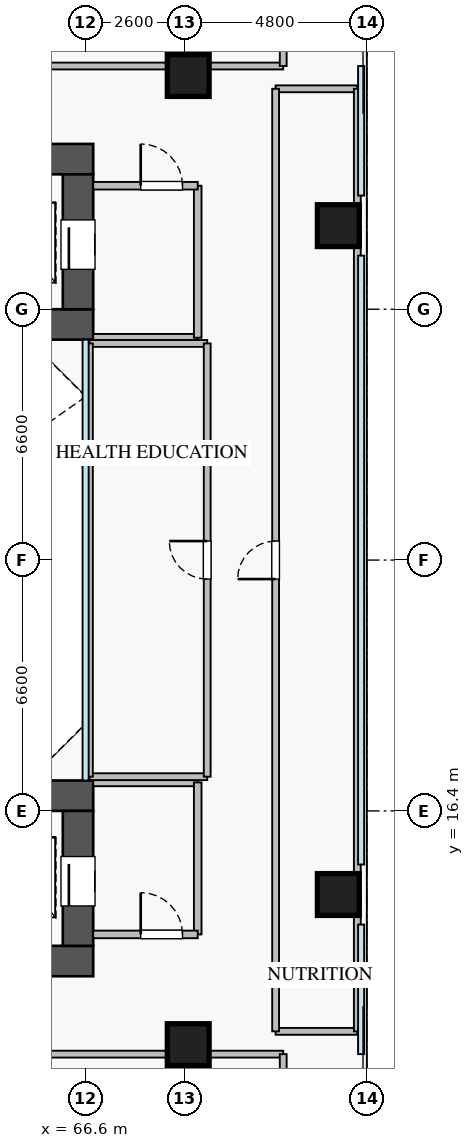
"""IFC4 building model, lengths in metres.
Left out: names, types, materials, properties, quantities, classifications, styles, units other than length and angle.
Written with IfcOpenShell. Run it as: python <this file> out.ifc"""

import sys

from ifc_helpers import new_model, si_unit, direction, frame, frame_2d, origin, origin_2d, place, context, subcontext, project, spatial, rectangle, extrude, source, transform, mapped, element, fill, save


model = new_model("IFC4")
c1 = context("Model", 3, precision=1e-05, world=origin(), true_north=direction((0.0, 1.0)))
c2 = subcontext(c1, "Body", "Model", "MODEL_VIEW")
j1 = project(units=[si_unit("LENGTHUNIT", "METRE"), si_unit("PLANEANGLEUNIT", "RADIAN")], contexts=[c1])
p1 = place(None, origin())
s1 = spatial("IfcSite", under=j1, at=p1, CompositionType="ELEMENT")
p2 = place(p1, origin())
s2 = spatial("IfcBuilding", under=s1, at=p2, CompositionType="ELEMENT")
p3 = place(p2, frame((0.0, 0.0, 5.0)))
s3 = spatial("IfcBuildingStorey", under=s2, at=p3, CompositionType="ELEMENT", Elevation=5.0)
p4 = place(p3, frame((54.2, 29.2, 0.0), z_axis=(0.0, 0.0, 1.0), x_axis=(1.0, 0.0, 0.0)))
e1 = element("IfcWall", 1, at=p4, inside=s3, PredefinedType="SHEAR", context=c2, shape_type="SweptSolid", body=[
    extrude(rectangle(XDim=12.6, YDim=0.8, at=frame_2d((6.3, 0.0))), origin(), (0.0, 0.0, 1.0), 4.4),
])
p5 = place(p3, frame((54.2, 33.55, 0.0), z_axis=(0.0, 0.0, 1.0), x_axis=(1.0, 0.0, 0.0)))
e2 = element("IfcWall", 2, at=p5, inside=s3, PredefinedType="SHEAR", context=c2, shape_type="SweptSolid", body=[
    extrude(rectangle(XDim=12.6, YDim=0.8, at=frame_2d((6.3, 0.0))), origin(), (0.0, 0.0, 1.0), 4.4),
])
p6 = place(p5, frame((8.2, 0.0, 0.0)))
e3 = element("IfcOpeningElement", 3, at=p6, cuts=e2, PredefinedType="OPENING", context=c2, shape_type="SweptSolid", body=[
    extrude(rectangle(XDim=1.1, YDim=2.05, at=frame_2d((0.55, 1.025))), frame((0.0, 0.41, 0.0), z_axis=(0.0, -1.0, 0.0), x_axis=(1.0, 0.0, 0.0)), (0.0, 0.0, 1.0), 0.82),
])
p7 = place(p3, frame((66.4, 29.6, 0.0), z_axis=(0.0, 0.0, 1.0), x_axis=(0.0, 1.0, 0.0)))
e4 = element("IfcWall", 4, at=p7, inside=s3, PredefinedType="SHEAR", context=c2, shape_type="SweptSolid", body=[
    extrude(rectangle(XDim=3.55, YDim=0.8, at=frame_2d((1.775, 0.0))), origin(), (0.0, 0.0, 1.0), 4.4),
])
p8 = place(p7, frame((1.05, 0.0, 0.0)))
e5 = element("IfcOpeningElement", 5, at=p8, cuts=e4, PredefinedType="OPENING", context=c2, shape_type="SweptSolid", body=[
    extrude(rectangle(XDim=1.3, YDim=2.05, at=frame_2d((0.65, 1.025))), frame((0.0, 0.41, 0.0), z_axis=(0.0, -1.0, 0.0), x_axis=(1.0, 0.0, 0.0)), (0.0, 0.0, 1.0), 0.82),
])
p9 = place(p3, frame((54.2, 12.45, 0.0), z_axis=(0.0, 0.0, 1.0), x_axis=(1.0, 0.0, 0.0)))
e6 = element("IfcWall", 6, at=p9, inside=s3, PredefinedType="SHEAR", context=c2, shape_type="SweptSolid", body=[
    extrude(rectangle(XDim=12.6, YDim=0.8, at=frame_2d((6.3, 0.0))), origin(), (0.0, 0.0, 1.0), 4.4),
])
p10 = place(p9, frame((8.2, 0.0, 0.0)))
e7 = element("IfcOpeningElement", 7, at=p10, cuts=e6, PredefinedType="OPENING", context=c2, shape_type="SweptSolid", body=[
    extrude(rectangle(XDim=1.1, YDim=2.05, at=frame_2d((0.55, 1.025))), frame((0.0, 0.41, 0.0), z_axis=(0.0, -1.0, 0.0), x_axis=(1.0, 0.0, 0.0)), (0.0, 0.0, 1.0), 0.82),
])
p11 = place(p3, frame((54.2, 16.8, 0.0), z_axis=(0.0, 0.0, 1.0), x_axis=(1.0, 0.0, 0.0)))
e8 = element("IfcWall", 8, at=p11, inside=s3, PredefinedType="SHEAR", context=c2, shape_type="SweptSolid", body=[
    extrude(rectangle(XDim=12.6, YDim=0.8, at=frame_2d((6.3, 0.0))), origin(), (0.0, 0.0, 1.0), 4.4),
])
p12 = place(p3, frame((66.4, 12.85, 0.0), z_axis=(0.0, 0.0, 1.0), x_axis=(0.0, 1.0, 0.0)))
e9 = element("IfcWall", 9, at=p12, inside=s3, PredefinedType="SHEAR", context=c2, shape_type="SweptSolid", body=[
    extrude(rectangle(XDim=3.55, YDim=0.8, at=frame_2d((1.775, 0.0))), origin(), (0.0, 0.0, 1.0), 4.4),
])
p13 = place(p12, frame((1.05, 0.0, 0.0)))
e10 = element("IfcOpeningElement", 10, at=p13, cuts=e9, PredefinedType="OPENING", context=c2, shape_type="SweptSolid", body=[
    extrude(rectangle(XDim=1.3, YDim=2.05, at=frame_2d((0.65, 1.025))), frame((0.0, 0.41, 0.0), z_axis=(0.0, -1.0, 0.0), x_axis=(1.0, 0.0, 0.0)), (0.0, 0.0, 1.0), 0.82),
])
m1 = source(origin(), c2, "Body", "SweptSolid", [
    extrude(rectangle(XDim=1.1, YDim=1.1, at=origin_2d()), origin(), (0.0, 0.0, 1.0), 4.4),
])
for number, where, z_axis, x_axis in (
    (11, (69.3, 10.25, 0.0), (0.0, 0.0, 1.0), (1.0, 0.0, 0.0)),
    (12, (73.25, 14.2, 0.0), (0.0, 0.0, 1.0), (1.0, 0.0, 0.0)),
    (13, (73.25, 31.8, 0.0), (0.0, 0.0, 1.0), (1.0, 0.0, 0.0)),
    (14, (69.3, 35.75, 0.0), (0.0, 0.0, 1.0), (1.0, 0.0, 0.0)),
):
    element("IfcColumn", number, at=place(p3, frame(where, z_axis=z_axis, x_axis=x_axis)), inside=s3, PredefinedType="COLUMN", context=c2, shape_type="MappedRepresentation", body=[
        mapped(m1, transform((0.0, 0.0, 0.0), x_axis=(1.0, 0.0, 0.0), y_axis=(0.0, 1.0, 0.0), z_axis=(0.0, 0.0, 1.0), scale=1.0)),
    ])
p14 = place(p3, frame((66.8, 28.85, 0.0), z_axis=(0.0, 0.0, 1.0), x_axis=(1.0, 0.0, 0.0)))
e15 = element("IfcWall", 15, at=p14, inside=s3, PredefinedType="PARTITIONING", context=c2, shape_type="SweptSolid", body=[
    extrude(rectangle(XDim=2.75, YDim=0.2, at=frame_2d((1.375, 0.0))), origin(), (0.0, 0.0, 1.0), 4.18),
])
p15 = place(p3, frame((69.55, 28.85, 0.0), z_axis=(0.0, 0.0, 1.0), x_axis=(0.0, 1.0, 0.0)))
e16 = element("IfcWall", 16, at=p15, inside=s3, PredefinedType="PARTITIONING", context=c2, shape_type="SweptSolid", body=[
    extrude(rectangle(XDim=4.0, YDim=0.2, at=frame_2d((2.0, 0.0))), origin(), (0.0, 0.0, 1.0), 4.18),
])
p16 = place(p3, frame((66.8, 32.85, 0.0), z_axis=(0.0, 0.0, 1.0), x_axis=(1.0, 0.0, 0.0)))
e17 = element("IfcWall", 17, at=p16, inside=s3, PredefinedType="PARTITIONING", context=c2, shape_type="SweptSolid", body=[
    extrude(rectangle(XDim=2.75, YDim=0.2, at=frame_2d((1.375, 0.0))), origin(), (0.0, 0.0, 1.0), 4.18),
])
p17 = place(p16, frame((1.25, 0.0, 0.0)))
e18 = element("IfcOpeningElement", 18, at=p17, cuts=e17, PredefinedType="OPENING", context=c2, shape_type="SweptSolid", body=[
    extrude(rectangle(XDim=1.1, YDim=2.05, at=frame_2d((0.55, 1.025))), frame((0.0, 0.11, 0.0), z_axis=(0.0, -1.0, 0.0), x_axis=(1.0, 0.0, 0.0)), (0.0, 0.0, 1.0), 0.22),
])
p18 = place(p3, frame((66.8, 17.15, 0.0), z_axis=(0.0, 0.0, 1.0), x_axis=(1.0, 0.0, 0.0)))
e19 = element("IfcWall", 19, at=p18, inside=s3, PredefinedType="PARTITIONING", context=c2, shape_type="SweptSolid", body=[
    extrude(rectangle(XDim=2.75, YDim=0.2, at=frame_2d((1.375, 0.0))), origin(), (0.0, 0.0, 1.0), 4.18),
])
p19 = place(p3, frame((69.55, 13.15, 0.0), z_axis=(0.0, 0.0, 1.0), x_axis=(0.0, 1.0, 0.0)))
e20 = element("IfcWall", 20, at=p19, inside=s3, PredefinedType="PARTITIONING", context=c2, shape_type="SweptSolid", body=[
    extrude(rectangle(XDim=4.0, YDim=0.2, at=frame_2d((2.0, 0.0))), origin(), (0.0, 0.0, 1.0), 4.18),
])
p20 = place(p3, frame((66.8, 13.15, 0.0), z_axis=(0.0, 0.0, 1.0), x_axis=(1.0, 0.0, 0.0)))
e21 = element("IfcWall", 21, at=p20, inside=s3, PredefinedType="PARTITIONING", context=c2, shape_type="SweptSolid", body=[
    extrude(rectangle(XDim=2.75, YDim=0.2, at=frame_2d((1.375, 0.0))), origin(), (0.0, 0.0, 1.0), 4.18),
])
p21 = place(p20, frame((1.25, 0.0, 0.0)))
e22 = element("IfcOpeningElement", 22, at=p21, cuts=e21, PredefinedType="OPENING", context=c2, shape_type="SweptSolid", body=[
    extrude(rectangle(XDim=1.1, YDim=2.05, at=frame_2d((0.55, 1.025))), frame((0.0, 0.11, 0.0), z_axis=(0.0, -1.0, 0.0), x_axis=(1.0, 0.0, 0.0)), (0.0, 0.0, 1.0), 0.22),
])
for number, where, z_axis, x_axis in (
    (23, (66.7, 17.3, 0.0), (0.0, 0.0, 1.0), (1.0, 0.0, 0.0)),
    (24, (66.7, 28.7, 0.0), (0.0, 0.0, 1.0), (1.0, 0.0, 0.0)),
):
    element("IfcWall", number, at=place(p3, frame(where, z_axis=z_axis, x_axis=x_axis)), inside=s3, PredefinedType="PARTITIONING", context=c2, shape_type="SweptSolid", body=[
        extrude(rectangle(XDim=3.1, YDim=0.18, at=frame_2d((1.55, 0.0))), origin(), (0.0, 0.0, 1.0), 4.18),
    ])
p22 = place(p3, frame((66.7, 17.3, 0.0), z_axis=(0.0, 0.0, 1.0), x_axis=(0.0, 1.0, 0.0)))
e25 = element("IfcWall", 25, at=p22, inside=s3, PredefinedType="PARTITIONING", context=c2, shape_type="SweptSolid", body=[
    extrude(rectangle(XDim=11.4, YDim=0.18, at=frame_2d((5.7, 0.0))), origin(), (0.0, 0.0, 1.0), 4.18),
])
p23 = place(p3, frame((69.8, 17.3, 0.0), z_axis=(0.0, 0.0, 1.0), x_axis=(0.0, 1.0, 0.0)))
e26 = element("IfcWall", 26, at=p23, inside=s3, PredefinedType="PARTITIONING", context=c2, shape_type="SweptSolid", body=[
    extrude(rectangle(XDim=11.4, YDim=0.18, at=frame_2d((5.7, 0.0))), origin(), (0.0, 0.0, 1.0), 4.18),
])
p24 = place(p23, frame((5.2, 0.0, 0.0)))
e27 = element("IfcOpeningElement", 27, at=p24, cuts=e26, PredefinedType="OPENING", context=c2, shape_type="SweptSolid", body=[
    extrude(rectangle(XDim=1.0, YDim=2.05, at=frame_2d((0.5, 1.025))), frame((0.0, 0.1, 0.0), z_axis=(0.0, -1.0, 0.0), x_axis=(1.0, 0.0, 0.0)), (0.0, 0.0, 1.0), 0.2),
])
for number, where, z_axis, x_axis in (
    (28, (71.6, 10.6, 0.0), (0.0, 0.0, 1.0), (1.0, 0.0, 0.0)),
    (29, (71.6, 35.4, 0.0), (0.0, 0.0, 1.0), (1.0, 0.0, 0.0)),
):
    element("IfcWall", number, at=place(p3, frame(where, z_axis=z_axis, x_axis=x_axis)), inside=s3, PredefinedType="PARTITIONING", context=c2, shape_type="SweptSolid", body=[
        extrude(rectangle(XDim=2.15, YDim=0.18, at=frame_2d((1.075, 0.0))), origin(), (0.0, 0.0, 1.0), 4.18),
    ])
p25 = place(p3, frame((71.6, 10.6, 0.0), z_axis=(0.0, 0.0, 1.0), x_axis=(0.0, 1.0, 0.0)))
e30 = element("IfcWall", 30, at=p25, inside=s3, PredefinedType="PARTITIONING", context=c2, shape_type="SweptSolid", body=[
    extrude(rectangle(XDim=24.8, YDim=0.18, at=frame_2d((12.4, 0.0))), origin(), (0.0, 0.0, 1.0), 4.18),
])
p26 = place(p25, frame((11.9, 0.0, 0.0)))
e31 = element("IfcOpeningElement", 31, at=p26, cuts=e30, PredefinedType="OPENING", context=c2, shape_type="SweptSolid", body=[
    extrude(rectangle(XDim=1.0, YDim=2.05, at=frame_2d((0.5, 1.025))), frame((0.0, 0.1, 0.0), z_axis=(0.0, -1.0, 0.0), x_axis=(1.0, 0.0, 0.0)), (0.0, 0.0, 1.0), 0.2),
])
p27 = place(p3, frame((73.75, 10.6, 0.0), z_axis=(0.0, 0.0, 1.0), x_axis=(0.0, 1.0, 0.0)))
e32 = element("IfcWall", 32, at=p27, inside=s3, PredefinedType="PARTITIONING", context=c2, shape_type="SweptSolid", body=[
    extrude(rectangle(XDim=24.8, YDim=0.18, at=frame_2d((12.4, 0.0))), origin(), (0.0, 0.0, 1.0), 4.18),
])
p28 = place(p3, frame((54.2, 10.0, 0.0), z_axis=(0.0, 0.0, 1.0), x_axis=(1.0, 0.0, 0.0)))
e33 = element("IfcWall", 33, at=p28, inside=s3, PredefinedType="PARTITIONING", context=c2, shape_type="SweptSolid", body=[
    extrude(rectangle(XDim=17.6, YDim=0.18, at=frame_2d((8.8, 0.0))), origin(), (0.0, 0.0, 1.0), 3.675),
])
p29 = place(p28, frame((8.3, 0.0, 0.0)))
e34 = element("IfcOpeningElement", 34, at=p29, cuts=e33, PredefinedType="OPENING", context=c2, shape_type="SweptSolid", body=[
    extrude(rectangle(XDim=1.0, YDim=2.05, at=frame_2d((0.5, 1.025))), frame((0.0, 0.1, 0.0), z_axis=(0.0, -1.0, 0.0), x_axis=(1.0, 0.0, 0.0)), (0.0, 0.0, 1.0), 0.2),
])
p30 = place(p3, frame((71.8, 2.4, 0.0), z_axis=(0.0, 0.0, 1.0), x_axis=(0.0, 1.0, 0.0)))
e35 = element("IfcWall", 35, at=p30, inside=s3, PredefinedType="PARTITIONING", context=c2, shape_type="SweptSolid", body=[
    extrude(rectangle(XDim=7.6, YDim=0.18, at=frame_2d((3.8, 0.0))), origin(), (0.0, 0.0, 1.0), 4.18),
])
p31 = place(p3, frame((54.2, 36.0, 0.0), z_axis=(0.0, 0.0, 1.0), x_axis=(1.0, 0.0, 0.0)))
e36 = element("IfcWall", 36, at=p31, inside=s3, PredefinedType="PARTITIONING", context=c2, shape_type="SweptSolid", body=[
    extrude(rectangle(XDim=17.6, YDim=0.18, at=frame_2d((8.8, 0.0))), origin(), (0.0, 0.0, 1.0), 3.675),
])
p32 = place(p31, frame((8.3, 0.0, 0.0)))
e37 = element("IfcOpeningElement", 37, at=p32, cuts=e36, PredefinedType="OPENING", context=c2, shape_type="SweptSolid", body=[
    extrude(rectangle(XDim=1.0, YDim=2.05, at=frame_2d((0.5, 1.025))), frame((0.0, 0.1, 0.0), z_axis=(0.0, -1.0, 0.0), x_axis=(1.0, 0.0, 0.0)), (0.0, 0.0, 1.0), 0.2),
])
p33 = place(p3, frame((71.8, 36.0, 0.0), z_axis=(0.0, 0.0, 1.0), x_axis=(0.0, 1.0, 0.0)))
e38 = element("IfcWall", 38, at=p33, inside=s3, PredefinedType="PARTITIONING", context=c2, shape_type="SweptSolid", body=[
    extrude(rectangle(XDim=7.6, YDim=0.18, at=frame_2d((3.8, 0.0))), origin(), (0.0, 0.0, 1.0), 4.18),
])
m2 = source(origin(), c2, "Body", "SweptSolid", [
    extrude(rectangle(XDim=1.3, YDim=2.05, at=frame_2d((0.65, 1.025))), frame((0.0, 0.025, 0.0), z_axis=(0.0, -1.0, 0.0), x_axis=(1.0, 0.0, 0.0)), (0.0, 0.0, 1.0), 0.05),
])
p34 = place(p8, origin())
e39 = element("IfcDoor", 39, at=p34, inside=s3, OperationType="SLIDING_TO_LEFT", PredefinedType="DOOR", context=c2, shape_type="MappedRepresentation", body=[
    mapped(m2, transform((0.0, 0.0, 0.0), x_axis=(1.0, 0.0, 0.0), y_axis=(0.0, 1.0, 0.0), z_axis=(0.0, 0.0, 1.0), scale=1.0)),
])
fill(e5, e39)
p35 = place(p13, origin())
e40 = element("IfcDoor", 40, at=p35, inside=s3, OperationType="SLIDING_TO_RIGHT", PredefinedType="DOOR", context=c2, shape_type="MappedRepresentation", body=[
    mapped(m2, transform((0.0, 0.0, 0.0), x_axis=(1.0, 0.0, 0.0), y_axis=(0.0, 1.0, 0.0), z_axis=(0.0, 0.0, 1.0), scale=1.0)),
])
fill(e10, e40)
m3 = source(origin(), c2, "Body", "SweptSolid", [
    extrude(rectangle(XDim=1.1, YDim=2.05, at=frame_2d((0.55, 1.025))), frame((0.0, 0.025, 0.0), z_axis=(0.0, -1.0, 0.0), x_axis=(1.0, 0.0, 0.0)), (0.0, 0.0, 1.0), 0.05),
])
p36 = place(p17, origin())
e41 = element("IfcDoor", 41, at=p36, inside=s3, OperationType="SINGLE_SWING_LEFT", PredefinedType="DOOR", context=c2, shape_type="MappedRepresentation", body=[
    mapped(m3, transform((0.0, 0.0, 0.0), x_axis=(1.0, 0.0, 0.0), y_axis=(0.0, 1.0, 0.0), z_axis=(0.0, 0.0, 1.0), scale=1.0)),
])
fill(e18, e41)
p37 = place(p21, origin())
e42 = element("IfcDoor", 42, at=p37, inside=s3, OperationType="SINGLE_SWING_LEFT", PredefinedType="DOOR", context=c2, shape_type="MappedRepresentation", body=[
    mapped(m3, transform((0.0, 0.0, 0.0), x_axis=(1.0, 0.0, 0.0), y_axis=(0.0, 1.0, 0.0), z_axis=(0.0, 0.0, 1.0), scale=1.0)),
])
fill(e22, e42)
m4 = source(origin(), c2, "Body", "SweptSolid", [
    extrude(rectangle(XDim=1.0, YDim=2.05, at=frame_2d((0.5, 1.025))), frame((0.0, 0.025, 0.0), z_axis=(0.0, -1.0, 0.0), x_axis=(1.0, 0.0, 0.0)), (0.0, 0.0, 1.0), 0.05),
])
p38 = place(p24, origin())
e43 = element("IfcDoor", 43, at=p38, inside=s3, OperationType="SINGLE_SWING_RIGHT", PredefinedType="DOOR", context=c2, shape_type="MappedRepresentation", body=[
    mapped(m4, transform((0.0, 0.0, 0.0), x_axis=(1.0, 0.0, 0.0), y_axis=(0.0, 1.0, 0.0), z_axis=(0.0, 0.0, 1.0), scale=1.0)),
])
fill(e27, e43)
p39 = place(p26, origin())
e44 = element("IfcDoor", 44, at=p39, inside=s3, OperationType="SINGLE_SWING_LEFT", PredefinedType="DOOR", context=c2, shape_type="MappedRepresentation", body=[
    mapped(m4, transform((0.0, 0.0, 0.0), x_axis=(1.0, 0.0, 0.0), y_axis=(0.0, 1.0, 0.0), z_axis=(0.0, 0.0, 1.0), scale=1.0)),
])
fill(e31, e44)
save(model, sys.argv[1])
